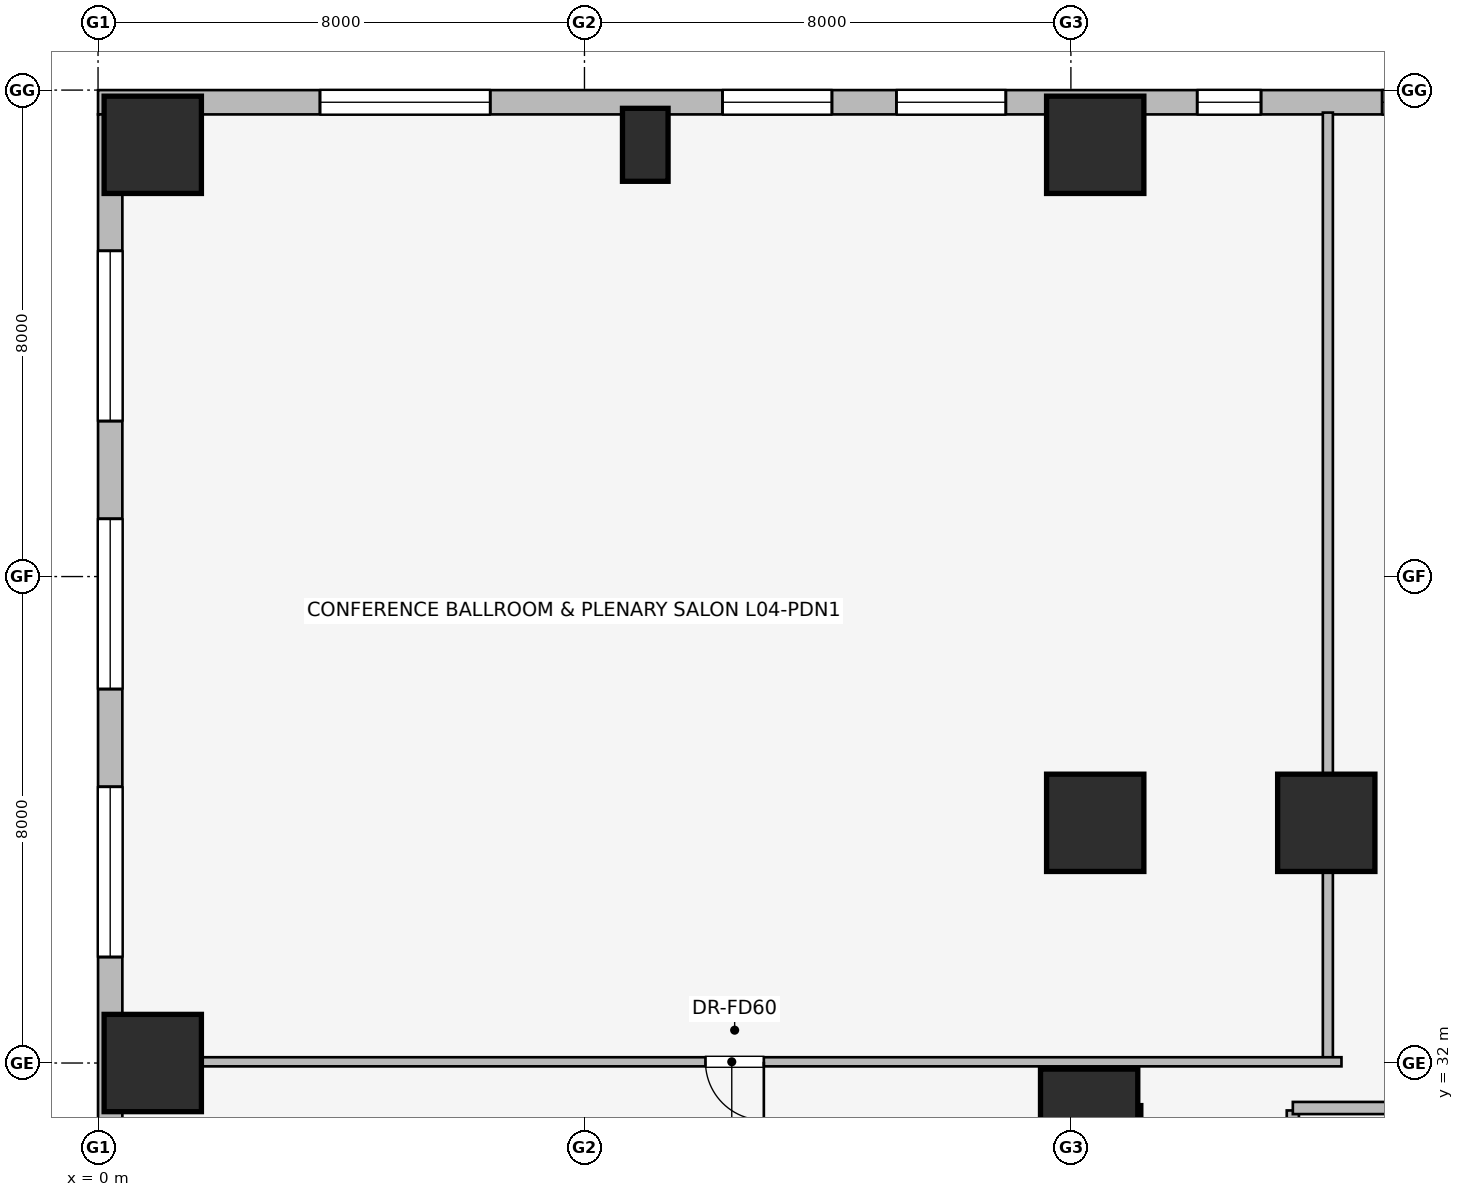
"""IFC4 building model, lengths in metres.
Left out: names, types, materials, properties, quantities, classifications, styles, units other than length and angle.
Written with IfcOpenShell. Run it as: python <this file> out.ifc"""

import sys

from ifc_helpers import new_model, si_unit, direction, frame, frame_2d, origin, origin_2d, place, context, subcontext, project, spatial, rectangle, extrude, element, fill, save


model = new_model("IFC4")
c1 = context("Model", 3, precision=1e-05, world=origin(), true_north=direction((0.0, 1.0)))
c2 = subcontext(c1, "Body", "Model", "MODEL_VIEW")
j1 = project(units=[si_unit("LENGTHUNIT", "METRE"), si_unit("PLANEANGLEUNIT", "RADIAN")], contexts=[c1])
p1 = place(None, origin())
s1 = spatial("IfcSite", under=j1, at=p1, CompositionType="ELEMENT")
p2 = place(p1, origin())
s2 = spatial("IfcBuilding", under=s1, at=p2, CompositionType="ELEMENT")
p3 = place(p2, frame((0.0, 0.0, 16.0)))
s3 = spatial("IfcBuildingStorey", under=s2, at=p3, CompositionType="ELEMENT", Elevation=16.0)
p4 = place(p3, frame((16.85, 25.68, 0.0), z_axis=(0.0, 0.0, 1.0), x_axis=(0.0, 1.0, 0.0)))
e1 = element("IfcWall", 1, at=p4, inside=s3, PredefinedType="SHEAR", context=c2, shape_type="SweptSolid", body=[
    extrude(rectangle(XDim=5.62, YDim=0.6, at=frame_2d((2.81, 0.0))), origin(), (0.0, 0.0, 1.0), 5.0),
])
for number, where, z_axis, x_axis in (
    (2, (16.3, 31.1, 0.0), (0.0, 0.0, 1.0), (1.0, 0.0, 0.0)),
    (3, (0.9, 47.1, 0.0), (0.0, 0.0, 1.0), (1.0, 0.0, 0.0)),
    (4, (16.4, 47.1, 0.0), (0.0, 0.0, 1.0), (1.0, 0.0, 0.0)),
    (5, (0.9, 32.0, 0.0), (0.0, 0.0, 1.0), (1.0, 0.0, 0.0)),
    (6, (20.2, 35.95, 0.0), (0.0, 0.0, 1.0), (1.0, 0.0, 0.0)),
    (7, (16.4, 35.95, 0.0), (0.0, 0.0, 1.0), (1.0, 0.0, 0.0)),
):
    element("IfcColumn", number, at=place(p3, frame(where, z_axis=z_axis, x_axis=x_axis)), inside=s3, PredefinedType="COLUMN", context=c2, shape_type="SweptSolid", body=[
        extrude(rectangle(XDim=1.6, YDim=1.6, at=origin_2d()), origin(), (0.0, 0.0, 1.0), 5.0),
    ])
p5 = place(p3, frame((9.0, 47.1, 0.0), z_axis=(0.0, 0.0, 1.0), x_axis=(1.0, 0.0, 0.0)))
e8 = element("IfcColumn", 8, at=p5, inside=s3, PredefinedType="PILASTER", context=c2, shape_type="SweptSolid", body=[
    extrude(rectangle(XDim=0.75, YDim=1.2, at=origin_2d()), origin(), (0.0, 0.0, 1.0), 5.0),
])
p6 = place(p3, frame((0.0, 47.8, 0.0), z_axis=(0.0, 0.0, 1.0), x_axis=(1.0, 0.0, 0.0)))
e9 = element("IfcWall", 9, at=p6, inside=s3, PredefinedType="STANDARD", context=c2, shape_type="SweptSolid", body=[
    extrude(rectangle(XDim=24.0, YDim=0.4, at=frame_2d((12.0, 0.0))), origin(), (0.0, 0.0, 1.0), 4.58),
])
p7 = place(p6, frame((3.65, 0.0, 0.75)))
e10 = element("IfcOpeningElement", 10, at=p7, cuts=e9, PredefinedType="OPENING", context=c2, shape_type="SweptSolid", body=[
    extrude(rectangle(XDim=2.8, YDim=1.8, at=frame_2d((1.4, 0.9))), frame((0.0, 0.21, 0.0), z_axis=(0.0, -1.0, 0.0), x_axis=(1.0, 0.0, 0.0)), (0.0, 0.0, 1.0), 0.42),
])
p8 = place(p6, frame((10.27, 0.0, 0.75)))
e11 = element("IfcOpeningElement", 11, at=p8, cuts=e9, PredefinedType="OPENING", context=c2, shape_type="SweptSolid", body=[
    extrude(rectangle(XDim=1.8, YDim=1.5, at=frame_2d((0.9, 0.75))), frame((0.0, 0.21, 0.0), z_axis=(0.0, -1.0, 0.0), x_axis=(1.0, 0.0, 0.0)), (0.0, 0.0, 1.0), 0.42),
])
p9 = place(p6, frame((13.13, 0.0, 0.75)))
e12 = element("IfcOpeningElement", 12, at=p9, cuts=e9, PredefinedType="OPENING", context=c2, shape_type="SweptSolid", body=[
    extrude(rectangle(XDim=1.8, YDim=1.5, at=frame_2d((0.9, 0.75))), frame((0.0, 0.21, 0.0), z_axis=(0.0, -1.0, 0.0), x_axis=(1.0, 0.0, 0.0)), (0.0, 0.0, 1.0), 0.42),
])
p10 = place(p6, frame((18.077, 0.0, 0.75)))
e13 = element("IfcOpeningElement", 13, at=p10, cuts=e9, PredefinedType="OPENING", context=c2, shape_type="SweptSolid", body=[
    extrude(rectangle(XDim=1.05, YDim=1.4, at=frame_2d((0.525, 0.7))), frame((0.0, 0.21, 0.0), z_axis=(0.0, -1.0, 0.0), x_axis=(1.0, 0.0, 0.0)), (0.0, 0.0, 1.0), 0.42),
])
p11 = place(p6, frame((21.119, 0.0, 0.75)))
e14 = element("IfcOpeningElement", 14, at=p11, cuts=e9, PredefinedType="OPENING", context=c2, shape_type="SweptSolid", body=[
    extrude(rectangle(XDim=1.8, YDim=1.5, at=frame_2d((0.9, 0.75))), frame((0.0, 0.21, 0.0), z_axis=(0.0, -1.0, 0.0), x_axis=(1.0, 0.0, 0.0)), (0.0, 0.0, 1.0), 0.42),
])
p12 = place(p3, frame((0.2, 31.0, 0.0), z_axis=(0.0, 0.0, 1.0), x_axis=(0.0, 1.0, 0.0)))
e15 = element("IfcWall", 15, at=p12, inside=s3, PredefinedType="STANDARD", context=c2, shape_type="SweptSolid", body=[
    extrude(rectangle(XDim=16.6, YDim=0.4, at=frame_2d((8.3, 0.0))), origin(), (0.0, 0.0, 1.0), 4.58),
])
p13 = place(p12, frame((2.743, 0.0, 0.75)))
e16 = element("IfcOpeningElement", 16, at=p13, cuts=e15, PredefinedType="OPENING", context=c2, shape_type="SweptSolid", body=[
    extrude(rectangle(XDim=2.8, YDim=1.8, at=frame_2d((1.4, 0.9))), frame((0.0, 0.21, 0.0), z_axis=(0.0, -1.0, 0.0), x_axis=(1.0, 0.0, 0.0)), (0.0, 0.0, 1.0), 0.42),
])
p14 = place(p12, frame((7.15, 0.0, 0.75)))
e17 = element("IfcOpeningElement", 17, at=p14, cuts=e15, PredefinedType="OPENING", context=c2, shape_type="SweptSolid", body=[
    extrude(rectangle(XDim=2.8, YDim=1.8, at=frame_2d((1.4, 0.9))), frame((0.0, 0.21, 0.0), z_axis=(0.0, -1.0, 0.0), x_axis=(1.0, 0.0, 0.0)), (0.0, 0.0, 1.0), 0.42),
])
p15 = place(p12, frame((11.557, 0.0, 0.75)))
e18 = element("IfcOpeningElement", 18, at=p15, cuts=e15, PredefinedType="OPENING", context=c2, shape_type="SweptSolid", body=[
    extrude(rectangle(XDim=2.8, YDim=1.8, at=frame_2d((1.4, 0.9))), frame((0.0, 0.21, 0.0), z_axis=(0.0, -1.0, 0.0), x_axis=(1.0, 0.0, 0.0)), (0.0, 0.0, 1.0), 0.42),
])
p16 = place(p3, frame((19.65, 25.68, 0.0), z_axis=(0.0, 0.0, 1.0), x_axis=(0.0, 1.0, 0.0)))
e19 = element("IfcWall", 19, at=p16, inside=s3, PredefinedType="PARTITIONING", context=c2, shape_type="SweptSolid", body=[
    extrude(rectangle(XDim=5.54, YDim=0.2, at=frame_2d((2.77, 0.0))), origin(), (0.0, 0.0, 1.0), 4.58),
])
p17 = place(p16, frame((0.62, 0.0, 0.0)))
e20 = element("IfcOpeningElement", 20, at=p17, cuts=e19, PredefinedType="OPENING", context=c2, shape_type="SweptSolid", body=[
    extrude(rectangle(XDim=1.1, YDim=2.2, at=frame_2d((0.55, 1.1))), frame((0.0, 0.11, 0.0), z_axis=(0.0, -1.0, 0.0), x_axis=(1.0, 0.0, 0.0)), (0.0, 0.0, 1.0), 0.22),
])
p18 = place(p16, frame((3.12, 0.0, 0.0)))
e21 = element("IfcOpeningElement", 21, at=p18, cuts=e19, PredefinedType="OPENING", context=c2, shape_type="SweptSolid", body=[
    extrude(rectangle(XDim=1.1, YDim=2.2, at=frame_2d((0.55, 1.1))), frame((0.0, 0.11, 0.0), z_axis=(0.0, -1.0, 0.0), x_axis=(1.0, 0.0, 0.0)), (0.0, 0.0, 1.0), 0.22),
])
p19 = place(p3, frame((21.33, 31.26, 0.0), z_axis=(0.0, 0.0, 1.0), x_axis=(-1.0, 0.0, 0.0)))
e22 = element("IfcWall", 22, at=p19, inside=s3, PredefinedType="PARTITIONING", context=c2, shape_type="SweptSolid", body=[
    extrude(rectangle(XDim=1.68, YDim=0.2, at=frame_2d((0.84, 0.0))), origin(), (0.0, 0.0, 1.0), 4.58),
])
p20 = place(p3, frame((20.226, 32.09, 0.0), z_axis=(0.0, 0.0, 1.0), x_axis=(0.0, 1.0, 0.0)))
e23 = element("IfcWall", 23, at=p20, inside=s3, PredefinedType="PARTITIONING", context=c2, shape_type="SweptSolid", body=[
    extrude(rectangle(XDim=15.54, YDim=0.165, at=frame_2d((7.77, 0.0))), origin(), (0.0, 0.0, 1.0), 4.58),
])
p21 = place(p3, frame((20.45, 32.02, 0.0), z_axis=(0.0, 0.0, 1.0), x_axis=(-1.0, 0.0, 0.0)))
e24 = element("IfcWall", 24, at=p21, inside=s3, PredefinedType="PARTITIONING", context=c2, shape_type="SweptSolid", body=[
    extrude(rectangle(XDim=20.055, YDim=0.15, at=frame_2d((10.027, 0.0))), origin(), (0.0, 0.0, 1.0), 3.632),
])
p22 = place(p21, frame((9.5, 0.0, 0.0)))
e25 = element("IfcOpeningElement", 25, at=p22, cuts=e24, PredefinedType="OPENING", context=c2, shape_type="SweptSolid", body=[
    extrude(rectangle(XDim=0.96, YDim=2.0, at=frame_2d((0.48, 1.0))), frame((0.0, 0.085, 0.0), z_axis=(0.0, -1.0, 0.0), x_axis=(1.0, 0.0, 0.0)), (0.0, 0.0, 1.0), 0.17),
])
p23 = place(p7, origin())
e26 = element("IfcWindow", 26, at=p23, inside=s3, PartitioningType="SINGLE_PANEL", PredefinedType="WINDOW", context=c2, shape_type="SweptSolid", body=[
    extrude(rectangle(XDim=2.8, YDim=1.8, at=frame_2d((1.4, 0.9))), frame((0.0, 0.03, 0.0), z_axis=(0.0, -1.0, 0.0), x_axis=(1.0, 0.0, 0.0)), (0.0, 0.0, 1.0), 0.06),
])
fill(e10, e26)
p24 = place(p8, origin())
e27 = element("IfcWindow", 27, at=p24, inside=s3, PartitioningType="SINGLE_PANEL", PredefinedType="WINDOW", context=c2, shape_type="SweptSolid", body=[
    extrude(rectangle(XDim=1.8, YDim=1.5, at=frame_2d((0.9, 0.75))), frame((0.0, 0.03, 0.0), z_axis=(0.0, -1.0, 0.0), x_axis=(1.0, 0.0, 0.0)), (0.0, 0.0, 1.0), 0.06),
])
fill(e11, e27)
p25 = place(p9, origin())
e28 = element("IfcWindow", 28, at=p25, inside=s3, PartitioningType="SINGLE_PANEL", PredefinedType="WINDOW", context=c2, shape_type="SweptSolid", body=[
    extrude(rectangle(XDim=1.8, YDim=1.5, at=frame_2d((0.9, 0.75))), frame((0.0, 0.03, 0.0), z_axis=(0.0, -1.0, 0.0), x_axis=(1.0, 0.0, 0.0)), (0.0, 0.0, 1.0), 0.06),
])
fill(e12, e28)
p26 = place(p10, origin())
e29 = element("IfcWindow", 29, at=p26, inside=s3, PartitioningType="SINGLE_PANEL", PredefinedType="WINDOW", context=c2, shape_type="SweptSolid", body=[
    extrude(rectangle(XDim=1.05, YDim=1.4, at=frame_2d((0.525, 0.7))), frame((0.0, 0.03, 0.0), z_axis=(0.0, -1.0, 0.0), x_axis=(1.0, 0.0, 0.0)), (0.0, 0.0, 1.0), 0.06),
])
fill(e13, e29)
p27 = place(p11, origin())
e30 = element("IfcWindow", 30, at=p27, inside=s3, PartitioningType="SINGLE_PANEL", PredefinedType="WINDOW", context=c2, shape_type="SweptSolid", body=[
    extrude(rectangle(XDim=1.8, YDim=1.5, at=frame_2d((0.9, 0.75))), frame((0.0, 0.03, 0.0), z_axis=(0.0, -1.0, 0.0), x_axis=(1.0, 0.0, 0.0)), (0.0, 0.0, 1.0), 0.06),
])
fill(e14, e30)
p28 = place(p13, origin())
e31 = element("IfcWindow", 31, at=p28, inside=s3, PartitioningType="SINGLE_PANEL", PredefinedType="WINDOW", context=c2, shape_type="SweptSolid", body=[
    extrude(rectangle(XDim=2.8, YDim=1.8, at=frame_2d((1.4, 0.9))), frame((0.0, 0.03, 0.0), z_axis=(0.0, -1.0, 0.0), x_axis=(1.0, 0.0, 0.0)), (0.0, 0.0, 1.0), 0.06),
])
fill(e16, e31)
p29 = place(p14, origin())
e32 = element("IfcWindow", 32, at=p29, inside=s3, PartitioningType="SINGLE_PANEL", PredefinedType="WINDOW", context=c2, shape_type="SweptSolid", body=[
    extrude(rectangle(XDim=2.8, YDim=1.8, at=frame_2d((1.4, 0.9))), frame((0.0, 0.03, 0.0), z_axis=(0.0, -1.0, 0.0), x_axis=(1.0, 0.0, 0.0)), (0.0, 0.0, 1.0), 0.06),
])
fill(e17, e32)
p30 = place(p15, origin())
e33 = element("IfcWindow", 33, at=p30, inside=s3, PartitioningType="SINGLE_PANEL", PredefinedType="WINDOW", context=c2, shape_type="SweptSolid", body=[
    extrude(rectangle(XDim=2.8, YDim=1.8, at=frame_2d((1.4, 0.9))), frame((0.0, 0.03, 0.0), z_axis=(0.0, -1.0, 0.0), x_axis=(1.0, 0.0, 0.0)), (0.0, 0.0, 1.0), 0.06),
])
fill(e18, e33)
p31 = place(p22, origin())
e34 = element("IfcDoor", 34, at=p31, inside=s3, OperationType="SINGLE_SWING_LEFT", PredefinedType="DOOR", context=c2, shape_type="SweptSolid", body=[
    extrude(rectangle(XDim=0.96, YDim=2.0, at=frame_2d((0.48, 1.0))), frame((0.0, 0.025, 0.0), z_axis=(0.0, -1.0, 0.0), x_axis=(1.0, 0.0, 0.0)), (0.0, 0.0, 1.0), 0.05),
])
fill(e25, e34)
save(model, sys.argv[1])
